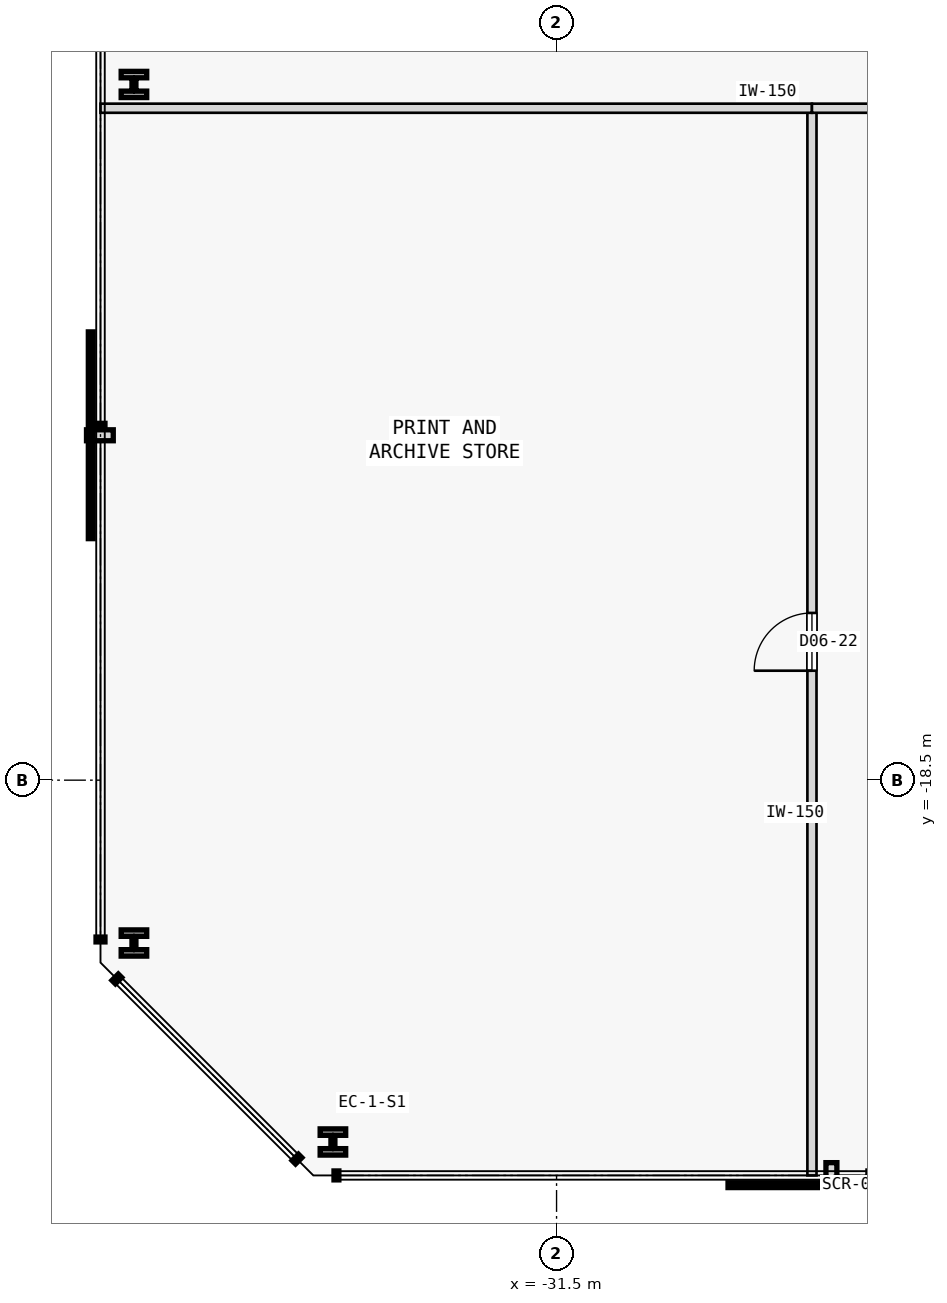
"""IFC4 building model, lengths in metres.
Left out: names, types, materials, properties, quantities, classifications, styles, units other than length and angle.
Written with IfcOpenShell. Run it as: python <this file> out.ifc"""

import sys

from ifc_helpers import new_model, si_unit, direction, frame, frame_2d, origin, origin_2d, place, context, subcontext, project, spatial, rectangle, i_section, extrude, element, fill, save


model = new_model("IFC4")
c1 = context("Model", 3, precision=1e-05, world=origin(), true_north=direction((0.0, 1.0)))
c2 = subcontext(c1, "Body", "Model", "MODEL_VIEW")
j1 = project(units=[si_unit("LENGTHUNIT", "METRE"), si_unit("PLANEANGLEUNIT", "RADIAN")], contexts=[c1])
p1 = place(None, origin())
s1 = spatial("IfcSite", under=j1, at=p1, CompositionType="ELEMENT")
p2 = place(p1, origin())
s2 = spatial("IfcBuilding", under=s1, at=p2, CompositionType="ELEMENT")
p3 = place(p2, frame((0.0, 0.0, 29.4)))
s3 = spatial("IfcBuildingStorey", under=s2, at=p3, CompositionType="ELEMENT", Elevation=29.4)
for number, where, z_axis, x_axis in (
    (1, (-35.178, -24.45, 0.0), (0.0, 0.0, 1.0), (1.0, 0.0, 0.0)),
    (2, (-38.45, -7.059, 0.0), (0.0, 0.0, 1.0), (1.0, 0.0, 0.0)),
    (3, (-38.45, -21.178, 0.0), (0.0, 0.0, 1.0), (1.0, 0.0, 0.0)),
):
    element("IfcColumn", number, at=place(p3, frame(where, z_axis=z_axis, x_axis=x_axis)), inside=s3, PredefinedType="COLUMN", context=c2, shape_type="SweptSolid", body=[
        extrude(i_section(OverallWidth=0.42, OverallDepth=0.431, WebThickness=0.065, FlangeThickness=0.106, FilletRadius=0.015, at=origin_2d()), origin(), (0.0, 0.0, 1.0), 3.8),
    ])
p4 = place(p3, frame((-27.3, -25.0, 0.0), z_axis=(0.0, 0.0, 1.0), x_axis=(0.0, 1.0, 0.0)))
e4 = element("IfcWall", 4, at=p4, inside=s3, PredefinedType="PARTITIONING", context=c2, shape_type="SweptSolid", body=[
    extrude(rectangle(XDim=17.55, YDim=0.15, at=frame_2d((8.775, 0.0))), origin(), (0.0, 0.0, 1.0), 3.575),
])
p5 = place(p4, frame((8.3, 0.0, 0.0)))
e5 = element("IfcOpeningElement", 5, at=p5, cuts=e4, PredefinedType="OPENING", context=c2, shape_type="SweptSolid", body=[
    extrude(rectangle(XDim=0.95, YDim=2.15, at=frame_2d((0.475, 1.075))), frame((0.0, 0.085, 0.0), z_axis=(0.0, -1.0, 0.0), x_axis=(1.0, 0.0, 0.0)), (0.0, 0.0, 1.0), 0.17),
])
p6 = place(p3, frame((-39.0, -7.45, 0.0), z_axis=(0.0, 0.0, 1.0), x_axis=(1.0, 0.0, 0.0)))
e6 = element("IfcWall", 6, at=p6, inside=s3, PredefinedType="PARTITIONING", context=c2, shape_type="SweptSolid", body=[
    extrude(rectangle(XDim=11.7, YDim=0.15, at=frame_2d((5.85, 0.0))), origin(), (0.0, 0.0, 1.0), 3.575),
])
p7 = place(p3, frame((-27.3, -7.45, 0.0), z_axis=(0.0, 0.0, 1.0), x_axis=(1.0, 0.0, 0.0)))
e7 = element("IfcWall", 7, at=p7, inside=s3, PredefinedType="PARTITIONING", context=c2, shape_type="SweptSolid", body=[
    extrude(rectangle(XDim=10.241, YDim=0.15, at=frame_2d((5.121, 0.0))), origin(), (0.0, 0.0, 1.0), 3.575),
])
p8 = place(p5, origin())
e8 = element("IfcDoor", 8, at=p8, inside=s3, OperationType="SINGLE_SWING_LEFT", PredefinedType="DOOR", context=c2, shape_type="SweptSolid", body=[
    extrude(rectangle(XDim=0.95, YDim=2.15, at=frame_2d((0.475, 1.075))), frame((0.0, 0.025, 0.0), z_axis=(0.0, -1.0, 0.0), x_axis=(1.0, 0.0, 0.0)), (0.0, 0.0, 1.0), 0.05),
])
fill(e5, e8)
save(model, sys.argv[1])
